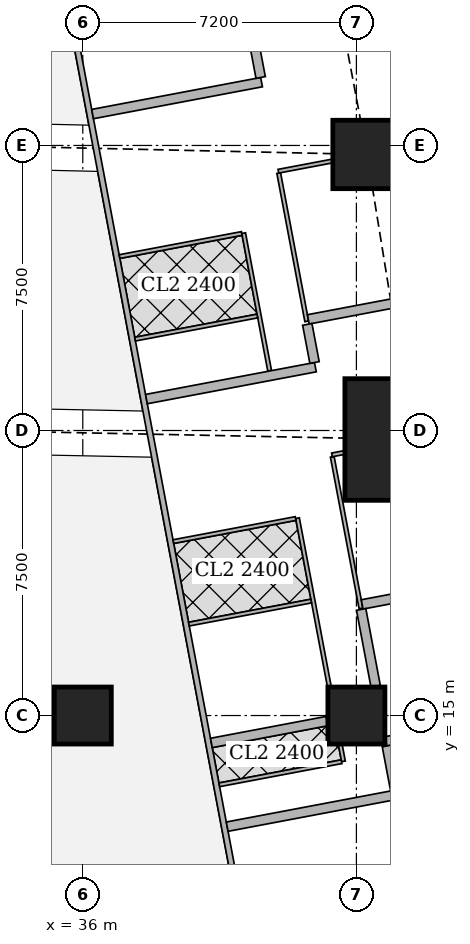
"""IFC4 building model, lengths in metres.
Left out: names, types, materials, properties, quantities, classifications, styles, units other than length and angle.
Written with IfcOpenShell. Run it as: python <this file> out.ifc"""

import sys

from ifc_helpers import new_model, si_unit, direction, frame, frame_2d, origin, origin_2d, place, context, subcontext, project, spatial, rectangle, extrude, element, fill, save


model = new_model("IFC4")
c1 = context("Model", 3, precision=1e-05, world=origin(), true_north=direction((0.0, 1.0)))
c2 = subcontext(c1, "Body", "Model", "MODEL_VIEW")
j1 = project(units=[si_unit("LENGTHUNIT", "METRE"), si_unit("PLANEANGLEUNIT", "RADIAN")], contexts=[c1])
p1 = place(None, origin())
s1 = spatial("IfcSite", under=j1, at=p1, CompositionType="ELEMENT")
p2 = place(p1, origin())
s2 = spatial("IfcBuilding", under=s1, at=p2, CompositionType="ELEMENT")
p3 = place(p2, frame((0.0, 0.0, 169.55)))
s3 = spatial("IfcBuildingStorey", under=s2, at=p3, CompositionType="ELEMENT", Elevation=169.55)
for number, where, z_axis, x_axis in (
    (1, (36.0, 15.0, 0.0), (0.0, 0.0, 1.0), (1.0, 0.0, 0.0)),
    (2, (43.2, 15.0, 0.0), (0.0, 0.0, 1.0), (1.0, 0.0, 0.0)),
):
    element("IfcColumn", number, at=place(p3, frame(where, z_axis=z_axis, x_axis=x_axis)), inside=s3, PredefinedType="COLUMN", context=c2, shape_type="SweptSolid", body=[
        extrude(rectangle(XDim=1.5, YDim=1.5, at=origin_2d()), origin(), (0.0, 0.0, 1.0), 3.75),
    ])
p4 = place(p3, frame((44.697, 22.263, 0.0), z_axis=(0.0, 0.0, 1.0), x_axis=(1.0, 0.0, 0.0)))
e3 = element("IfcColumn", 3, at=p4, inside=s3, PredefinedType="COLUMN", context=c2, shape_type="SweptSolid", body=[
    extrude(rectangle(XDim=3.6, YDim=3.2, at=origin_2d()), origin(), (0.0, 0.0, 1.0), 3.75),
])
p5 = place(p3, frame((43.48, 29.763, 0.0), z_axis=(0.0, 0.0, 1.0), x_axis=(1.0, 0.0, 0.0)))
e4 = element("IfcColumn", 4, at=p5, inside=s3, PredefinedType="COLUMN", context=c2, shape_type="SweptSolid", body=[
    extrude(rectangle(XDim=1.8, YDim=1.8, at=origin_2d()), origin(), (0.0, 0.0, 1.0), 3.75),
])
p6 = place(p3, frame((50.653, 2.703, 0.0), z_axis=(0.0, 0.0, 1.0), x_axis=(-0.185612026696, 0.982623109613, 0.0)))
e5 = element("IfcWall", 5, at=p6, inside=s3, PredefinedType="SOLIDWALL", context=c2, shape_type="SweptSolid", body=[
    extrude(rectangle(XDim=41.393, YDim=0.2, at=frame_2d((20.697, 0.0))), origin(), (0.0, 0.0, 1.0), 3.5),
])
p7 = place(p6, frame((1.633, 0.0, 0.9)))
e6 = element("IfcOpeningElement", 6, at=p7, cuts=e5, PredefinedType="OPENING", context=c2, shape_type="SweptSolid", body=[
    extrude(rectangle(XDim=1.8, YDim=1.5, at=frame_2d((0.9, 0.75))), frame((0.0, 0.11, 0.0), z_axis=(0.0, -1.0, 0.0), x_axis=(1.0, 0.0, 0.0)), (0.0, 0.0, 1.0), 0.22),
])
p8 = place(p6, frame((6.032, 0.0, 0.9)))
e7 = element("IfcOpeningElement", 7, at=p8, cuts=e5, PredefinedType="OPENING", context=c2, shape_type="SweptSolid", body=[
    extrude(rectangle(XDim=1.8, YDim=1.5, at=frame_2d((0.9, 0.75))), frame((0.0, 0.11, 0.0), z_axis=(0.0, -1.0, 0.0), x_axis=(1.0, 0.0, 0.0)), (0.0, 0.0, 1.0), 0.22),
])
p9 = place(p6, frame((9.848, 0.0, 0.9)))
e8 = element("IfcOpeningElement", 8, at=p9, cuts=e5, PredefinedType="OPENING", context=c2, shape_type="SweptSolid", body=[
    extrude(rectangle(XDim=1.8, YDim=1.5, at=frame_2d((0.9, 0.75))), frame((0.0, 0.11, 0.0), z_axis=(0.0, -1.0, 0.0), x_axis=(1.0, 0.0, 0.0)), (0.0, 0.0, 1.0), 0.22),
])
p10 = place(p6, frame((13.664, 0.0, 0.9)))
e9 = element("IfcOpeningElement", 9, at=p10, cuts=e5, PredefinedType="OPENING", context=c2, shape_type="SweptSolid", body=[
    extrude(rectangle(XDim=1.8, YDim=1.5, at=frame_2d((0.9, 0.75))), frame((0.0, 0.11, 0.0), z_axis=(0.0, -1.0, 0.0), x_axis=(1.0, 0.0, 0.0)), (0.0, 0.0, 1.0), 0.22),
])
p11 = place(p6, frame((17.481, 0.0, 0.9)))
e10 = element("IfcOpeningElement", 10, at=p11, cuts=e5, PredefinedType="OPENING", context=c2, shape_type="SweptSolid", body=[
    extrude(rectangle(XDim=1.8, YDim=1.5, at=frame_2d((0.9, 0.75))), frame((0.0, 0.11, 0.0), z_axis=(0.0, -1.0, 0.0), x_axis=(1.0, 0.0, 0.0)), (0.0, 0.0, 1.0), 0.22),
])
p12 = place(p6, frame((21.297, 0.0, 0.9)))
e11 = element("IfcOpeningElement", 11, at=p12, cuts=e5, PredefinedType="OPENING", context=c2, shape_type="SweptSolid", body=[
    extrude(rectangle(XDim=1.8, YDim=1.5, at=frame_2d((0.9, 0.75))), frame((0.0, 0.11, 0.0), z_axis=(0.0, -1.0, 0.0), x_axis=(1.0, 0.0, 0.0)), (0.0, 0.0, 1.0), 0.22),
])
p13 = place(p6, frame((25.113, 0.0, 0.9)))
e12 = element("IfcOpeningElement", 12, at=p13, cuts=e5, PredefinedType="OPENING", context=c2, shape_type="SweptSolid", body=[
    extrude(rectangle(XDim=1.8, YDim=1.5, at=frame_2d((0.9, 0.75))), frame((0.0, 0.11, 0.0), z_axis=(0.0, -1.0, 0.0), x_axis=(1.0, 0.0, 0.0)), (0.0, 0.0, 1.0), 0.22),
])
p14 = place(p6, frame((28.93, 0.0, 0.9)))
e13 = element("IfcOpeningElement", 13, at=p14, cuts=e5, PredefinedType="OPENING", context=c2, shape_type="SweptSolid", body=[
    extrude(rectangle(XDim=1.8, YDim=1.5, at=frame_2d((0.9, 0.75))), frame((0.0, 0.11, 0.0), z_axis=(0.0, -1.0, 0.0), x_axis=(1.0, 0.0, 0.0)), (0.0, 0.0, 1.0), 0.22),
])
p15 = place(p6, frame((32.746, 0.0, 0.9)))
e14 = element("IfcOpeningElement", 14, at=p15, cuts=e5, PredefinedType="OPENING", context=c2, shape_type="SweptSolid", body=[
    extrude(rectangle(XDim=1.8, YDim=1.5, at=frame_2d((0.9, 0.75))), frame((0.0, 0.11, 0.0), z_axis=(0.0, -1.0, 0.0), x_axis=(1.0, 0.0, 0.0)), (0.0, 0.0, 1.0), 0.22),
])
p16 = place(p6, frame((36.481, 0.0, 0.9)))
e15 = element("IfcOpeningElement", 15, at=p16, cuts=e5, PredefinedType="OPENING", context=c2, shape_type="SweptSolid", body=[
    extrude(rectangle(XDim=1.8, YDim=1.5, at=frame_2d((0.9, 0.75))), frame((0.0, 0.11, 0.0), z_axis=(0.0, -1.0, 0.0), x_axis=(1.0, 0.0, 0.0)), (0.0, 0.0, 1.0), 0.22),
])
p17 = place(p3, frame((33.877, 43.029, 0.0), z_axis=(0.0, 0.0, 1.0), x_axis=(0.185596841028, -0.98262597798, 0.0)))
e16 = element("IfcWall", 16, at=p17, inside=s3, PredefinedType="SOLIDWALL", context=c2, shape_type="SweptSolid", body=[
    extrude(rectangle(XDim=41.66, YDim=0.15, at=frame_2d((20.83, 0.0))), origin(), (0.0, 0.0, 1.0), 2.5),
])
p18 = place(p17, frame((8.63, 0.0, 0.0)))
e17 = element("IfcOpeningElement", 17, at=p18, cuts=e16, PredefinedType="OPENING", context=c2, shape_type="SweptSolid", body=[
    extrude(rectangle(XDim=1.0, YDim=2.1, at=frame_2d((0.5, 1.05))), frame((0.0, 0.085, 0.0), z_axis=(0.0, -1.0, 0.0), x_axis=(1.0, 0.0, 0.0)), (0.0, 0.0, 1.0), 0.17),
])
p19 = place(p17, frame((13.841, 0.0, 0.0)))
e18 = element("IfcOpeningElement", 18, at=p19, cuts=e16, PredefinedType="OPENING", context=c2, shape_type="SweptSolid", body=[
    extrude(rectangle(XDim=1.0, YDim=2.1, at=frame_2d((0.5, 1.05))), frame((0.0, 0.085, 0.0), z_axis=(0.0, -1.0, 0.0), x_axis=(1.0, 0.0, 0.0)), (0.0, 0.0, 1.0), 0.17),
])
p20 = place(p17, frame((21.474, 0.0, 0.0)))
e19 = element("IfcOpeningElement", 19, at=p20, cuts=e16, PredefinedType="OPENING", context=c2, shape_type="SweptSolid", body=[
    extrude(rectangle(XDim=1.0, YDim=2.1, at=frame_2d((0.5, 1.05))), frame((0.0, 0.085, 0.0), z_axis=(0.0, -1.0, 0.0), x_axis=(1.0, 0.0, 0.0)), (0.0, 0.0, 1.0), 0.17),
])
p21 = place(p17, frame((30.4, 0.0, 0.0)))
e20 = element("IfcOpeningElement", 20, at=p21, cuts=e16, PredefinedType="OPENING", context=c2, shape_type="SweptSolid", body=[
    extrude(rectangle(XDim=1.0, YDim=2.1, at=frame_2d((0.5, 1.05))), frame((0.0, 0.085, 0.0), z_axis=(0.0, -1.0, 0.0), x_axis=(1.0, 0.0, 0.0)), (0.0, 0.0, 1.0), 0.17),
])
p22 = place(p17, frame((32.288, 0.0, 0.0)))
e21 = element("IfcOpeningElement", 21, at=p22, cuts=e16, PredefinedType="OPENING", context=c2, shape_type="SweptSolid", body=[
    extrude(rectangle(XDim=1.0, YDim=2.1, at=frame_2d((0.5, 1.05))), frame((0.0, 0.085, 0.0), z_axis=(0.0, -1.0, 0.0), x_axis=(1.0, 0.0, 0.0)), (0.0, 0.0, 1.0), 0.17),
])
p23 = place(p3, frame((41.156, 29.273, 0.0), z_axis=(0.0, 0.0, 1.0), x_axis=(0.185662195158, -0.982613631744, 0.0)))
e22 = element("IfcWall", 22, at=p23, inside=s3, PredefinedType="PARTITIONING", context=c2, shape_type="SweptSolid", body=[
    extrude(rectangle(XDim=3.97, YDim=0.1, at=frame_2d((1.985, 0.0))), origin(), (0.0, 0.0, 1.0), 2.5),
])
p24 = place(p23, frame((1.581, 0.0, 0.0)))
e23 = element("IfcOpeningElement", 23, at=p24, cuts=e22, PredefinedType="OPENING", context=c2, shape_type="SweptSolid", body=[
    extrude(rectangle(XDim=0.9, YDim=2.1, at=frame_2d((0.45, 1.05))), frame((0.0, 0.06, 0.0), z_axis=(0.0, -1.0, 0.0), x_axis=(1.0, 0.0, 0.0)), (0.0, 0.0, 1.0), 0.12),
])
p25 = place(p3, frame((40.233, 27.693, 0.0), z_axis=(0.0, 0.0, 1.0), x_axis=(0.185632361754, -0.982619268216, 0.0)))
e24 = element("IfcWall", 24, at=p25, inside=s3, PredefinedType="PARTITIONING", context=c2, shape_type="SweptSolid", body=[
    extrude(rectangle(XDim=3.685, YDim=0.1, at=frame_2d((1.843, 0.0))), origin(), (0.0, 0.0, 1.0), 3.5),
])
p26 = place(p25, frame((0.655, 0.0, 0.0)))
e25 = element("IfcOpeningElement", 25, at=p26, cuts=e24, PredefinedType="OPENING", context=c2, shape_type="SweptSolid", body=[
    extrude(rectangle(XDim=0.9, YDim=2.1, at=frame_2d((0.45, 1.05))), frame((0.0, 0.06, 0.0), z_axis=(0.0, -1.0, 0.0), x_axis=(1.0, 0.0, 0.0)), (0.0, 0.0, 1.0), 0.12),
])
p27 = place(p25, frame((2.563, 0.0, 0.0)))
e26 = element("IfcOpeningElement", 26, at=p27, cuts=e24, PredefinedType="OPENING", context=c2, shape_type="SweptSolid", body=[
    extrude(rectangle(XDim=0.9, YDim=2.1, at=frame_2d((0.45, 1.05))), frame((0.0, 0.06, 0.0), z_axis=(0.0, -1.0, 0.0), x_axis=(1.0, 0.0, 0.0)), (0.0, 0.0, 1.0), 0.12),
])
p28 = place(p3, frame((42.57, 29.591, 0.0), z_axis=(0.0, 0.0, 1.0), x_axis=(-0.98259436979, -0.185764109712, 0.0)))
e27 = element("IfcWall", 27, at=p28, inside=s3, PredefinedType="PARTITIONING", context=c2, shape_type="SweptSolid", body=[
    extrude(rectangle(XDim=1.448, YDim=0.1, at=frame_2d((0.724, 0.0))), origin(), (0.0, 0.0, 1.0), 2.5),
])
for number, where, z_axis, x_axis in (
    (28, (40.184, 27.684, 0.0), (0.0, 0.0, 1.0), (-0.983, -0.186, 0.0)),
    (29, (40.594, 25.512, 0.0), (0.0, 0.0, 1.0), (-0.983, -0.186, 0.0)),
):
    element("IfcWall", number, at=place(p3, frame(where, z_axis=z_axis, x_axis=x_axis)), inside=s3, PredefinedType="PARTITIONING", context=c2, shape_type="SweptSolid", body=[
        extrude(rectangle(XDim=3.274, YDim=0.1, at=frame_2d((1.637, 0.0))), origin(), (0.0, 0.0, 1.0), 3.5),
    ])
p29 = place(p3, frame((40.704, 31.666, 0.0), z_axis=(0.0, 0.0, 1.0), x_axis=(-0.982612837616, -0.185666398014, 0.0)))
e30 = element("IfcWall", 30, at=p29, inside=s3, PredefinedType="SOLIDWALL", context=c2, shape_type="SweptSolid", body=[
    extrude(rectangle(XDim=4.525, YDim=0.25, at=frame_2d((2.262, 0.0))), origin(), (0.0, 0.0, 1.0), 3.5),
])
p30 = place(p3, frame((40.491, 32.792, 0.0), z_axis=(0.0, 0.0, 1.0), x_axis=(0.18607888991, -0.982534806879, 0.0)))
e31 = element("IfcWall", 31, at=p30, inside=s3, PredefinedType="SOLIDWALL", context=c2, shape_type="SweptSolid", body=[
    extrude(rectangle(XDim=1.021, YDim=0.25, at=frame_2d((0.51, 0.0))), origin(), (0.0, 0.0, 1.0), 3.5),
])
p31 = place(p3, frame((42.565, 21.809, 0.0), z_axis=(0.0, 0.0, 1.0), x_axis=(0.185910488551, -0.982566684885, 0.0)))
e32 = element("IfcWall", 32, at=p31, inside=s3, PredefinedType="PARTITIONING", context=c2, shape_type="SweptSolid", body=[
    extrude(rectangle(XDim=4.062, YDim=0.1, at=frame_2d((2.031, 0.0))), origin(), (0.0, 0.0, 1.0), 2.5),
])
p32 = place(p31, frame((1.618, 0.0, 0.0)))
e33 = element("IfcOpeningElement", 33, at=p32, cuts=e32, PredefinedType="OPENING", context=c2, shape_type="SweptSolid", body=[
    extrude(rectangle(XDim=0.9, YDim=2.1, at=frame_2d((0.45, 1.05))), frame((0.0, 0.06, 0.0), z_axis=(0.0, -1.0, 0.0), x_axis=(1.0, 0.0, 0.0)), (0.0, 0.0, 1.0), 0.12),
])
p33 = place(p3, frame((41.65, 20.193, 0.0), z_axis=(0.0, 0.0, 1.0), x_axis=(0.185692658583, -0.982607875273, 0.0)))
e34 = element("IfcWall", 34, at=p33, inside=s3, PredefinedType="PARTITIONING", context=c2, shape_type="SweptSolid", body=[
    extrude(rectangle(XDim=4.514, YDim=0.1, at=frame_2d((2.257, 0.0))), origin(), (0.0, 0.0, 1.0), 3.5),
])
p34 = place(p33, frame((0.655, 0.0, 0.0)))
e35 = element("IfcOpeningElement", 35, at=p34, cuts=e34, PredefinedType="OPENING", context=c2, shape_type="SweptSolid", body=[
    extrude(rectangle(XDim=0.9, YDim=2.1, at=frame_2d((0.45, 1.05))), frame((0.0, 0.06, 0.0), z_axis=(0.0, -1.0, 0.0), x_axis=(1.0, 0.0, 0.0)), (0.0, 0.0, 1.0), 0.12),
])
p35 = place(p33, frame((3.35, 0.0, 0.0)))
e36 = element("IfcOpeningElement", 36, at=p35, cuts=e34, PredefinedType="OPENING", context=c2, shape_type="SweptSolid", body=[
    extrude(rectangle(XDim=0.9, YDim=2.1, at=frame_2d((0.45, 1.05))), frame((0.0, 0.06, 0.0), z_axis=(0.0, -1.0, 0.0), x_axis=(1.0, 0.0, 0.0)), (0.0, 0.0, 1.0), 0.12),
])
p36 = place(p3, frame((42.887, 21.921, 0.0), z_axis=(0.0, 0.0, 1.0), x_axis=(-0.982274918032, -0.187445953293, 0.0)))
e37 = element("IfcWall", 37, at=p36, inside=s3, PredefinedType="PARTITIONING", context=c2, shape_type="SweptSolid", body=[
    extrude(rectangle(XDim=0.336, YDim=0.1, at=frame_2d((0.168, 0.0))), origin(), (0.0, 0.0, 1.0), 2.5),
])
p37 = place(p3, frame((41.601, 20.184, 0.0), z_axis=(0.0, 0.0, 1.0), x_axis=(-0.982607026909, -0.185697147715, 0.0)))
e38 = element("IfcWall", 38, at=p37, inside=s3, PredefinedType="PARTITIONING", context=c2, shape_type="SweptSolid", body=[
    extrude(rectangle(XDim=3.275, YDim=0.1, at=frame_2d((1.637, 0.0))), origin(), (0.0, 0.0, 1.0), 3.5),
])
p38 = place(p3, frame((42.011, 18.012, 0.0), z_axis=(0.0, 0.0, 1.0), x_axis=(-0.982674977865, -0.185337227447, 0.0)))
e39 = element("IfcWall", 39, at=p38, inside=s3, PredefinedType="PARTITIONING", context=c2, shape_type="SweptSolid", body=[
    extrude(rectangle(XDim=3.275, YDim=0.1, at=frame_2d((1.637, 0.0))), origin(), (0.0, 0.0, 1.0), 3.5),
])
p39 = place(p3, frame((46.11, 26.213, 0.0), z_axis=(0.0, 0.0, 1.0), x_axis=(-0.982623519589, -0.185609856287, 0.0)))
e40 = element("IfcWall", 40, at=p39, inside=s3, PredefinedType="SOLIDWALL", context=c2, shape_type="SweptSolid", body=[
    extrude(rectangle(XDim=4.25, YDim=0.25, at=frame_2d((2.125, 0.0))), origin(), (0.0, 0.0, 1.0), 2.1),
])
p40 = place(p3, frame((42.121, 24.166, 0.0), z_axis=(0.0, 0.0, 1.0), x_axis=(-0.982612837616, -0.185666398014, 0.0)))
e41 = element("IfcWall", 41, at=p40, inside=s3, PredefinedType="SOLIDWALL", context=c2, shape_type="SweptSolid", body=[
    extrude(rectangle(XDim=4.525, YDim=0.25, at=frame_2d((2.262, 0.0))), origin(), (0.0, 0.0, 1.0), 3.5),
])
p41 = place(p3, frame((41.908, 25.292, 0.0), z_axis=(0.0, 0.0, 1.0), x_axis=(0.18607888991, -0.982534806879, 0.0)))
e42 = element("IfcWall", 42, at=p41, inside=s3, PredefinedType="SOLIDWALL", context=c2, shape_type="SweptSolid", body=[
    extrude(rectangle(XDim=1.021, YDim=0.25, at=frame_2d((0.51, 0.0))), origin(), (0.0, 0.0, 1.0), 3.5),
])
p42 = place(p3, frame((42.775, 14.24, 0.0), z_axis=(0.0, 0.0, 1.0), x_axis=(0.185035443692, -0.982731847748, 0.0)))
e43 = element("IfcWall", 43, at=p42, inside=s3, PredefinedType="PARTITIONING", context=c2, shape_type="SweptSolid", body=[
    extrude(rectangle(XDim=0.454, YDim=0.1, at=frame_2d((0.227, 0.0))), origin(), (0.0, 0.0, 1.0), 3.5),
])
p43 = place(p3, frame((42.81, 13.785, 0.0), z_axis=(0.0, 0.0, 1.0), x_axis=(-0.982620626894, -0.185625169636, 0.0)))
e44 = element("IfcWall", 44, at=p43, inside=s3, PredefinedType="PARTITIONING", context=c2, shape_type="SweptSolid", body=[
    extrude(rectangle(XDim=3.275, YDim=0.1, at=frame_2d((1.637, 0.0))), origin(), (0.0, 0.0, 1.0), 3.5),
])
p44 = place(p43, frame((1.201, 0.0, 0.0)))
e45 = element("IfcOpeningElement", 45, at=p44, cuts=e44, PredefinedType="OPENING", context=c2, shape_type="SweptSolid", body=[
    extrude(rectangle(XDim=0.9, YDim=2.1, at=frame_2d((0.45, 1.05))), frame((0.0, 0.06, 0.0), z_axis=(0.0, -1.0, 0.0), x_axis=(1.0, 0.0, 0.0)), (0.0, 0.0, 1.0), 0.12),
])
p45 = place(p3, frame((47.527, 18.712, 0.0), z_axis=(0.0, 0.0, 1.0), x_axis=(-0.982665405803, -0.185387972203, 0.0)))
e46 = element("IfcWall", 46, at=p45, inside=s3, PredefinedType="SOLIDWALL", context=c2, shape_type="SweptSolid", body=[
    extrude(rectangle(XDim=4.25, YDim=0.25, at=frame_2d((2.125, 0.0))), origin(), (0.0, 0.0, 1.0), 2.1),
])
p46 = place(p3, frame((42.426, 14.854, 0.0), z_axis=(0.0, 0.0, 1.0), x_axis=(-0.982603320446, -0.185716759201, 0.0)))
e47 = element("IfcWall", 47, at=p46, inside=s3, PredefinedType="SOLIDWALL", context=c2, shape_type="SweptSolid", body=[
    extrude(rectangle(XDim=3.096, YDim=0.25, at=frame_2d((1.548, 0.0))), origin(), (0.0, 0.0, 1.0), 3.5),
])
p47 = place(p3, frame((43.325, 17.792, 0.0), z_axis=(0.0, 0.0, 1.0), x_axis=(0.185565963553, -0.982631809566, 0.0)))
e48 = element("IfcWall", 48, at=p47, inside=s3, PredefinedType="SOLIDWALL", context=c2, shape_type="SweptSolid", body=[
    extrude(rectangle(XDim=2.054, YDim=0.25, at=frame_2d((1.027, 0.0))), origin(), (0.0, 0.0, 1.0), 3.5),
])
p48 = place(p3, frame((45.39, 14.588, 0.0), z_axis=(0.0, 0.0, 1.0), x_axis=(-0.982680951688, -0.18530555089, 0.0)))
e49 = element("IfcWall", 49, at=p48, inside=s3, PredefinedType="SOLIDWALL", context=c2, shape_type="SweptSolid", body=[
    extrude(rectangle(XDim=1.435, YDim=0.25, at=frame_2d((0.717, 0.0))), origin(), (0.0, 0.0, 1.0), 2.1),
])
p49 = place(p3, frame((44.246, 12.916, 0.0), z_axis=(0.0, 0.0, 1.0), x_axis=(-0.982612837616, -0.185666398014, 0.0)))
e50 = element("IfcWall", 50, at=p49, inside=s3, PredefinedType="SOLIDWALL", context=c2, shape_type="SweptSolid", body=[
    extrude(rectangle(XDim=4.525, YDim=0.25, at=frame_2d((2.262, 0.0))), origin(), (0.0, 0.0, 1.0), 3.5),
])
p50 = place(p3, frame((44.003, 14.199, 0.0), z_axis=(0.0, 0.0, 1.0), x_axis=(0.186323326179, -0.982488482437, 0.0)))
e51 = element("IfcWall", 51, at=p50, inside=s3, PredefinedType="SOLIDWALL", context=c2, shape_type="SweptSolid", body=[
    extrude(rectangle(XDim=1.181, YDim=0.25, at=frame_2d((0.59, 0.0))), origin(), (0.0, 0.0, 1.0), 3.5),
])
p51 = place(p24, origin())
e52 = element("IfcDoor", 52, at=p51, inside=s3, OperationType="SINGLE_SWING_RIGHT", PredefinedType="DOOR", context=c2, shape_type="SweptSolid", body=[
    extrude(rectangle(XDim=0.9, YDim=2.1, at=frame_2d((0.45, 1.05))), frame((0.0, 0.025, 0.0), z_axis=(0.0, -1.0, 0.0), x_axis=(1.0, 0.0, 0.0)), (0.0, 0.0, 1.0), 0.05),
])
fill(e23, e52)
p52 = place(p26, origin())
e53 = element("IfcDoor", 53, at=p52, inside=s3, OperationType="SINGLE_SWING_RIGHT", PredefinedType="DOOR", context=c2, shape_type="SweptSolid", body=[
    extrude(rectangle(XDim=0.9, YDim=2.1, at=frame_2d((0.45, 1.05))), frame((0.0, 0.025, 0.0), z_axis=(0.0, -1.0, 0.0), x_axis=(1.0, 0.0, 0.0)), (0.0, 0.0, 1.0), 0.05),
])
fill(e25, e53)
p53 = place(p27, origin())
e54 = element("IfcDoor", 54, at=p53, inside=s3, OperationType="SINGLE_SWING_LEFT", PredefinedType="DOOR", context=c2, shape_type="SweptSolid", body=[
    extrude(rectangle(XDim=0.9, YDim=2.1, at=frame_2d((0.45, 1.05))), frame((0.0, 0.025, 0.0), z_axis=(0.0, -1.0, 0.0), x_axis=(1.0, 0.0, 0.0)), (0.0, 0.0, 1.0), 0.05),
])
fill(e26, e54)
p54 = place(p19, origin())
e55 = element("IfcDoor", 55, at=p54, inside=s3, OperationType="SINGLE_SWING_RIGHT", PredefinedType="DOOR", context=c2, shape_type="SweptSolid", body=[
    extrude(rectangle(XDim=1.0, YDim=2.1, at=frame_2d((0.5, 1.05))), frame((0.0, 0.025, 0.0), z_axis=(0.0, -1.0, 0.0), x_axis=(1.0, 0.0, 0.0)), (0.0, 0.0, 1.0), 0.05),
])
fill(e18, e55)
p55 = place(p32, origin())
e56 = element("IfcDoor", 56, at=p55, inside=s3, OperationType="SINGLE_SWING_RIGHT", PredefinedType="DOOR", context=c2, shape_type="SweptSolid", body=[
    extrude(rectangle(XDim=0.9, YDim=2.1, at=frame_2d((0.45, 1.05))), frame((0.0, 0.025, 0.0), z_axis=(0.0, -1.0, 0.0), x_axis=(1.0, 0.0, 0.0)), (0.0, 0.0, 1.0), 0.05),
])
fill(e33, e56)
p56 = place(p34, origin())
e57 = element("IfcDoor", 57, at=p56, inside=s3, OperationType="SINGLE_SWING_RIGHT", PredefinedType="DOOR", context=c2, shape_type="SweptSolid", body=[
    extrude(rectangle(XDim=0.9, YDim=2.1, at=frame_2d((0.45, 1.05))), frame((0.0, 0.025, 0.0), z_axis=(0.0, -1.0, 0.0), x_axis=(1.0, 0.0, 0.0)), (0.0, 0.0, 1.0), 0.05),
])
fill(e35, e57)
p57 = place(p35, origin())
e58 = element("IfcDoor", 58, at=p57, inside=s3, OperationType="SINGLE_SWING_LEFT", PredefinedType="DOOR", context=c2, shape_type="SweptSolid", body=[
    extrude(rectangle(XDim=0.9, YDim=2.1, at=frame_2d((0.45, 1.05))), frame((0.0, 0.025, 0.0), z_axis=(0.0, -1.0, 0.0), x_axis=(1.0, 0.0, 0.0)), (0.0, 0.0, 1.0), 0.05),
])
fill(e36, e58)
p58 = place(p20, origin())
e59 = element("IfcDoor", 59, at=p58, inside=s3, OperationType="SINGLE_SWING_RIGHT", PredefinedType="DOOR", context=c2, shape_type="SweptSolid", body=[
    extrude(rectangle(XDim=1.0, YDim=2.1, at=frame_2d((0.5, 1.05))), frame((0.0, 0.025, 0.0), z_axis=(0.0, -1.0, 0.0), x_axis=(1.0, 0.0, 0.0)), (0.0, 0.0, 1.0), 0.05),
])
fill(e19, e59)
p59 = place(p44, origin())
e60 = element("IfcDoor", 60, at=p59, inside=s3, OperationType="SINGLE_SWING_LEFT", PredefinedType="DOOR", context=c2, shape_type="SweptSolid", body=[
    extrude(rectangle(XDim=0.9, YDim=2.1, at=frame_2d((0.45, 1.05))), frame((0.0, 0.025, 0.0), z_axis=(0.0, -1.0, 0.0), x_axis=(1.0, 0.0, 0.0)), (0.0, 0.0, 1.0), 0.05),
])
fill(e45, e60)
p60 = place(p21, origin())
e61 = element("IfcDoor", 61, at=p60, inside=s3, OperationType="SINGLE_SWING_LEFT", PredefinedType="DOOR", context=c2, shape_type="SweptSolid", body=[
    extrude(rectangle(XDim=1.0, YDim=2.1, at=frame_2d((0.5, 1.05))), frame((0.0, 0.025, 0.0), z_axis=(0.0, -1.0, 0.0), x_axis=(1.0, 0.0, 0.0)), (0.0, 0.0, 1.0), 0.05),
])
fill(e20, e61)
p61 = place(p22, origin())
e62 = element("IfcDoor", 62, at=p61, inside=s3, OperationType="SINGLE_SWING_RIGHT", PredefinedType="DOOR", context=c2, shape_type="SweptSolid", body=[
    extrude(rectangle(XDim=1.0, YDim=2.1, at=frame_2d((0.5, 1.05))), frame((0.0, 0.025, 0.0), z_axis=(0.0, -1.0, 0.0), x_axis=(1.0, 0.0, 0.0)), (0.0, 0.0, 1.0), 0.05),
])
fill(e21, e62)
save(model, sys.argv[1])
